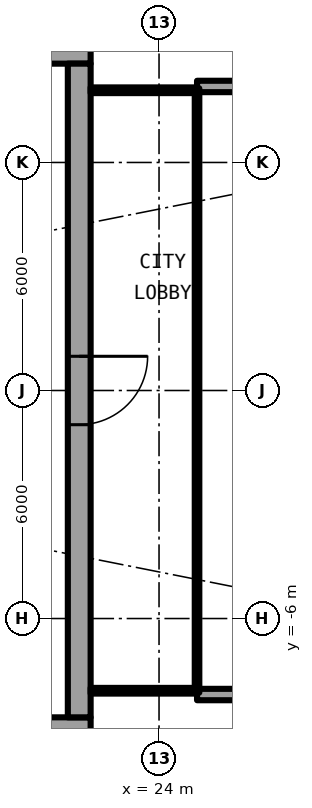
"""IFC4 building model, lengths in metres.
Left out: names, types, materials, properties, quantities, classifications, styles, units other than length and angle.
Written with IfcOpenShell. Run it as: python <this file> out.ifc"""

import sys

from ifc_helpers import new_model, si_unit, direction, frame, frame_2d, origin, place, context, subcontext, project, spatial, rectangle, extrude, element, fill, save


model = new_model("IFC4")
c1 = context("Model", 3, precision=1e-05, world=origin(), true_north=direction((0.0, 1.0)))
c2 = subcontext(c1, "Body", "Model", "MODEL_VIEW")
j1 = project(units=[si_unit("LENGTHUNIT", "METRE"), si_unit("PLANEANGLEUNIT", "RADIAN")], contexts=[c1])
p1 = place(None, origin())
s1 = spatial("IfcSite", under=j1, at=p1, CompositionType="ELEMENT")
p2 = place(p1, origin())
s2 = spatial("IfcBuilding", under=s1, at=p2, CompositionType="ELEMENT")
p3 = place(p2, frame((0.0, 0.0, 123.85)))
s3 = spatial("IfcBuildingStorey", under=s2, at=p3, CompositionType="ELEMENT", Elevation=123.85)
for number, where, z_axis, x_axis in (
    (1, (25.0, 8.0, 0.0), (0.0, 0.0, 1.0), (1.0, 0.0, 0.0)),
    (2, (25.0, -8.0, 0.0), (0.0, 0.0, 1.0), (1.0, 0.0, 0.0)),
):
    element("IfcWall", number, at=place(p3, frame(where, z_axis=z_axis, x_axis=x_axis)), inside=s3, PredefinedType="SOLIDWALL", context=c2, shape_type="SweptSolid", body=[
        extrude(rectangle(XDim=2.667, YDim=0.3, at=frame_2d((1.333, 0.0))), origin(), (0.0, 0.0, 1.0), 2.7),
    ])
p4 = place(p3, frame((22.2, 8.9, 0.0), z_axis=(0.0, 0.0, 1.0), x_axis=(-1.0, 0.0, 0.0)))
e3 = element("IfcWall", 3, at=p4, inside=s3, PredefinedType="SHEAR", context=c2, shape_type="SweptSolid", body=[
    extrude(rectangle(XDim=13.8, YDim=0.6, at=frame_2d((6.9, 0.0))), origin(), (0.0, 0.0, 1.0), 3.05),
])
p5 = place(p4, frame((1.125, 0.0, 0.0)))
e4 = element("IfcOpeningElement", 4, at=p5, cuts=e3, PredefinedType="OPENING", context=c2, shape_type="SweptSolid", body=[
    extrude(rectangle(XDim=1.2, YDim=2.3, at=frame_2d((0.6, 1.15))), frame((0.0, 0.31, 0.0), z_axis=(0.0, -1.0, 0.0), x_axis=(1.0, 0.0, 0.0)), (0.0, 0.0, 1.0), 0.62),
])
p6 = place(p3, frame((8.4, -8.9, 0.0), z_axis=(0.0, 0.0, 1.0), x_axis=(1.0, 0.0, 0.0)))
e5 = element("IfcWall", 5, at=p6, inside=s3, PredefinedType="SHEAR", context=c2, shape_type="SweptSolid", body=[
    extrude(rectangle(XDim=13.8, YDim=0.6, at=frame_2d((6.9, 0.0))), origin(), (0.0, 0.0, 1.0), 3.05),
])
p7 = place(p6, frame((11.475, 0.0, 0.0)))
e6 = element("IfcOpeningElement", 6, at=p7, cuts=e5, PredefinedType="OPENING", context=c2, shape_type="SweptSolid", body=[
    extrude(rectangle(XDim=1.2, YDim=2.3, at=frame_2d((0.6, 1.15))), frame((0.0, 0.31, 0.0), z_axis=(0.0, -1.0, 0.0), x_axis=(1.0, 0.0, 0.0)), (0.0, 0.0, 1.0), 0.62),
])
p8 = place(p3, frame((21.9, 8.6, 0.0), z_axis=(0.0, 0.0, 1.0), x_axis=(0.0, -1.0, 0.0)))
e7 = element("IfcWall", 7, at=p8, inside=s3, PredefinedType="SHEAR", context=c2, shape_type="SweptSolid", body=[
    extrude(rectangle(XDim=17.2, YDim=0.6, at=frame_2d((8.6, 0.0))), origin(), (0.0, 0.0, 1.0), 3.05),
])
p9 = place(p8, frame((7.7, 0.0, 0.0)))
e8 = element("IfcOpeningElement", 8, at=p9, cuts=e7, PredefinedType="OPENING", context=c2, shape_type="SweptSolid", body=[
    extrude(rectangle(XDim=1.8, YDim=2.3, at=frame_2d((0.9, 1.15))), frame((0.0, 0.31, 0.0), z_axis=(0.0, -1.0, 0.0), x_axis=(1.0, 0.0, 0.0)), (0.0, 0.0, 1.0), 0.62),
])
for number, where, z_axis, x_axis in (
    (9, (22.2, -7.9, 0.0), (0.0, 0.0, 1.0), (1.0, 0.0, 0.0)),
    (10, (22.2, 7.9, 0.0), (0.0, 0.0, 1.0), (1.0, 0.0, 0.0)),
):
    element("IfcWall", number, at=place(p3, frame(where, z_axis=z_axis, x_axis=x_axis)), inside=s3, PredefinedType="PARTITIONING", context=c2, shape_type="SweptSolid", body=[
        extrude(rectangle(XDim=2.74, YDim=0.15, at=frame_2d((1.37, 0.0))), origin(), (0.0, 0.0, 1.0), 2.7),
    ])
p10 = place(p3, frame((25.0, -7.95, 0.0), z_axis=(0.0, 0.0, 1.0), x_axis=(0.0, 1.0, 0.0)))
e11 = element("IfcWall", 11, at=p10, inside=s3, PredefinedType="PARTITIONING", context=c2, shape_type="SweptSolid", body=[
    extrude(rectangle(XDim=15.9, YDim=0.12, at=frame_2d((7.95, 0.0))), origin(), (0.0, 0.0, 1.0), 2.7),
])
p11 = place(p10, frame((0.95, 0.0, 0.1)))
e12 = element("IfcOpeningElement", 12, at=p11, cuts=e11, PredefinedType="OPENING", context=c2, shape_type="SweptSolid", body=[
    extrude(rectangle(XDim=14.0, YDim=2.35, at=frame_2d((7.0, 1.175))), frame((0.0, 0.07, 0.0), z_axis=(0.0, -1.0, 0.0), x_axis=(1.0, 0.0, 0.0)), (0.0, 0.0, 1.0), 0.14),
])
p12 = place(p9, origin())
e13 = element("IfcDoor", 13, at=p12, inside=s3, OperationType="SINGLE_SWING_LEFT", PredefinedType="DOOR", context=c2, shape_type="SweptSolid", body=[
    extrude(rectangle(XDim=1.8, YDim=2.3, at=frame_2d((0.9, 1.15))), frame((0.0, 0.025, 0.0), z_axis=(0.0, -1.0, 0.0), x_axis=(1.0, 0.0, 0.0)), (0.0, 0.0, 1.0), 0.05),
])
fill(e8, e13)
p13 = place(p11, origin())
e14 = element("IfcWindow", 14, at=p13, inside=s3, PartitioningType="SINGLE_PANEL", PredefinedType="WINDOW", context=c2, shape_type="SweptSolid", body=[
    extrude(rectangle(XDim=14.0, YDim=2.35, at=frame_2d((7.0, 1.175))), frame((0.0, 0.03, 0.0), z_axis=(0.0, -1.0, 0.0), x_axis=(1.0, 0.0, 0.0)), (0.0, 0.0, 1.0), 0.06),
])
fill(e12, e14)
save(model, sys.argv[1])
